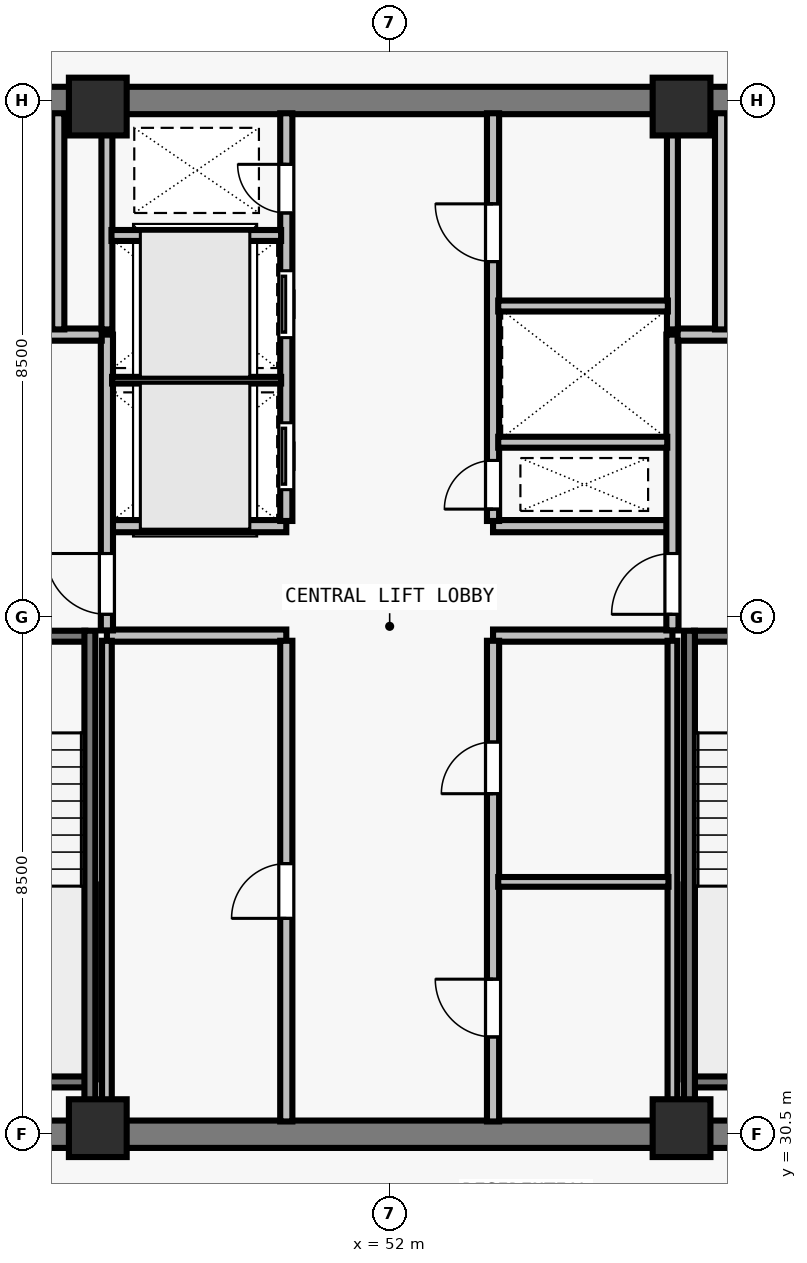
"""IFC4 building model, lengths in metres.
Left out: names, types, materials, properties, quantities, classifications, styles, units other than length and angle.
Written with IfcOpenShell. Run it as: python <this file> out.ifc"""

import sys

from ifc_helpers import new_model, si_unit, direction, frame, frame_2d, origin, origin_2d, place, context, subcontext, project, spatial, rectangle, extrude, element, fill, save


model = new_model("IFC4")
c1 = context("Model", 3, precision=1e-05, world=origin(), true_north=direction((0.0, 1.0)))
c2 = subcontext(c1, "Body", "Model", "MODEL_VIEW")
j1 = project(units=[si_unit("LENGTHUNIT", "METRE"), si_unit("PLANEANGLEUNIT", "RADIAN")], contexts=[c1])
p1 = place(None, origin())
s1 = spatial("IfcSite", under=j1, at=p1, CompositionType="ELEMENT")
p2 = place(p1, origin())
s2 = spatial("IfcBuilding", under=s1, at=p2, CompositionType="ELEMENT")
p3 = place(p2, frame((0.0, 0.0, 262.0)))
s3 = spatial("IfcBuildingStorey", under=s2, at=p3, CompositionType="ELEMENT", Elevation=262.0)
for number, where, z_axis, x_axis in (
    (1, (47.2, 30.6, 0.0), (0.0, 0.0, 1.0), (1.0, 0.0, 0.0)),
    (2, (56.8, 30.6, 0.0), (0.0, 0.0, 1.0), (1.0, 0.0, 0.0)),
    (3, (47.2, 47.4, 0.0), (0.0, 0.0, 1.0), (1.0, 0.0, 0.0)),
    (4, (56.8, 47.4, 0.0), (0.0, 0.0, 1.0), (1.0, 0.0, 0.0)),
):
    element("IfcColumn", number, at=place(p3, frame(where, z_axis=z_axis, x_axis=x_axis)), inside=s3, PredefinedType="COLUMN", context=c2, shape_type="SweptSolid", body=[
        extrude(rectangle(XDim=0.95, YDim=0.95, at=origin_2d()), origin(), (0.0, 0.0, 1.0), 3.5),
    ])
for number, where, z_axis, x_axis in (
    (5, (43.275, 30.5, 0.0), (0.0, 0.0, 1.0), (1.0, 0.0, 0.0)),
    (6, (43.275, 47.5, 0.0), (0.0, 0.0, 1.0), (1.0, 0.0, 0.0)),
):
    element("IfcWall", number, at=place(p3, frame(where, z_axis=z_axis, x_axis=x_axis)), inside=s3, PredefinedType="SHEAR", context=c2, shape_type="SweptSolid", body=[
        extrude(rectangle(XDim=17.45, YDim=0.45, at=frame_2d((8.725, 0.0))), origin(), (0.0, 0.0, 1.0), 3.29),
    ])
for number, where, z_axis, x_axis in (
    (7, (47.35, 38.7, 0.0), (0.0, 0.0, 1.0), (1.0, 0.0, 0.0)),
    (8, (47.35, 40.5, 0.0), (0.0, 0.0, 1.0), (1.0, 0.0, 0.0)),
    (9, (53.7, 38.7, 0.0), (0.0, 0.0, 1.0), (1.0, 0.0, 0.0)),
    (10, (53.7, 40.5, 0.0), (0.0, 0.0, 1.0), (1.0, 0.0, 0.0)),
):
    element("IfcWall", number, at=place(p3, frame(where, z_axis=z_axis, x_axis=x_axis)), inside=s3, PredefinedType="SOLIDWALL", context=c2, shape_type="SweptSolid", body=[
        extrude(rectangle(XDim=2.95, YDim=0.2, at=frame_2d((1.475, 0.0))), origin(), (0.0, 0.0, 1.0), 3.29),
    ])
p4 = place(p3, frame((50.3, 30.71, 0.0), z_axis=(0.0, 0.0, 1.0), x_axis=(0.0, 1.0, 0.0)))
e11 = element("IfcWall", 11, at=p4, inside=s3, PredefinedType="SOLIDWALL", context=c2, shape_type="SweptSolid", body=[
    extrude(rectangle(XDim=7.905, YDim=0.2, at=frame_2d((3.953, 0.0))), origin(), (0.0, 0.0, 1.0), 3.29),
])
p5 = place(p4, frame((3.34, 0.0, 0.0)))
e12 = element("IfcOpeningElement", 12, at=p5, cuts=e11, PredefinedType="OPENING", context=c2, shape_type="SweptSolid", body=[
    extrude(rectangle(XDim=0.9, YDim=2.12, at=frame_2d((0.45, 1.06))), frame((0.0, 0.11, 0.0), z_axis=(0.0, -1.0, 0.0), x_axis=(1.0, 0.0, 0.0)), (0.0, 0.0, 1.0), 0.22),
])
p6 = place(p3, frame((53.7, 30.71, 0.0), z_axis=(0.0, 0.0, 1.0), x_axis=(0.0, 1.0, 0.0)))
e13 = element("IfcWall", 13, at=p6, inside=s3, PredefinedType="SOLIDWALL", context=c2, shape_type="SweptSolid", body=[
    extrude(rectangle(XDim=7.905, YDim=0.2, at=frame_2d((3.953, 0.0))), origin(), (0.0, 0.0, 1.0), 3.29),
])
p7 = place(p6, frame((1.39, 0.0, 0.0)))
e14 = element("IfcOpeningElement", 14, at=p7, cuts=e13, PredefinedType="OPENING", context=c2, shape_type="SweptSolid", body=[
    extrude(rectangle(XDim=0.95, YDim=2.12, at=frame_2d((0.475, 1.06))), frame((0.0, 0.11, 0.0), z_axis=(0.0, -1.0, 0.0), x_axis=(1.0, 0.0, 0.0)), (0.0, 0.0, 1.0), 0.22),
])
p8 = place(p6, frame((5.39, 0.0, 0.0)))
e15 = element("IfcOpeningElement", 15, at=p8, cuts=e13, PredefinedType="OPENING", context=c2, shape_type="SweptSolid", body=[
    extrude(rectangle(XDim=0.85, YDim=2.12, at=frame_2d((0.425, 1.06))), frame((0.0, 0.11, 0.0), z_axis=(0.0, -1.0, 0.0), x_axis=(1.0, 0.0, 0.0)), (0.0, 0.0, 1.0), 0.22),
])
p9 = place(p3, frame((50.3, 40.585, 0.0), z_axis=(0.0, 0.0, 1.0), x_axis=(0.0, 1.0, 0.0)))
e16 = element("IfcWall", 16, at=p9, inside=s3, PredefinedType="SOLIDWALL", context=c2, shape_type="SweptSolid", body=[
    extrude(rectangle(XDim=6.705, YDim=0.2, at=frame_2d((3.353, 0.0))), origin(), (0.0, 0.0, 1.0), 3.29),
])
p10 = place(p9, frame((0.515, 0.0, 0.0)))
e17 = element("IfcOpeningElement", 17, at=p10, cuts=e16, PredefinedType="OPENING", context=c2, shape_type="SweptSolid", body=[
    extrude(rectangle(XDim=1.1, YDim=2.2, at=frame_2d((0.55, 1.1))), frame((0.0, 0.11, 0.0), z_axis=(0.0, -1.0, 0.0), x_axis=(1.0, 0.0, 0.0)), (0.0, 0.0, 1.0), 0.22),
])
p11 = place(p9, frame((3.015, 0.0, 0.0)))
e18 = element("IfcOpeningElement", 18, at=p11, cuts=e16, PredefinedType="OPENING", context=c2, shape_type="SweptSolid", body=[
    extrude(rectangle(XDim=1.1, YDim=2.2, at=frame_2d((0.55, 1.1))), frame((0.0, 0.11, 0.0), z_axis=(0.0, -1.0, 0.0), x_axis=(1.0, 0.0, 0.0)), (0.0, 0.0, 1.0), 0.22),
])
p12 = place(p9, frame((5.065, 0.0, 0.0)))
e19 = element("IfcOpeningElement", 19, at=p12, cuts=e16, PredefinedType="OPENING", context=c2, shape_type="SweptSolid", body=[
    extrude(rectangle(XDim=0.8, YDim=2.08, at=frame_2d((0.4, 1.04))), frame((0.0, 0.11, 0.0), z_axis=(0.0, -1.0, 0.0), x_axis=(1.0, 0.0, 0.0)), (0.0, 0.0, 1.0), 0.22),
])
p13 = place(p3, frame((53.7, 40.585, 0.0), z_axis=(0.0, 0.0, 1.0), x_axis=(0.0, 1.0, 0.0)))
e20 = element("IfcWall", 20, at=p13, inside=s3, PredefinedType="SOLIDWALL", context=c2, shape_type="SweptSolid", body=[
    extrude(rectangle(XDim=6.705, YDim=0.2, at=frame_2d((3.353, 0.0))), origin(), (0.0, 0.0, 1.0), 3.29),
])
p14 = place(p13, frame((0.195, 0.0, 0.0)))
e21 = element("IfcOpeningElement", 21, at=p14, cuts=e20, PredefinedType="OPENING", context=c2, shape_type="SweptSolid", body=[
    extrude(rectangle(XDim=0.8, YDim=2.08, at=frame_2d((0.4, 1.04))), frame((0.0, 0.11, 0.0), z_axis=(0.0, -1.0, 0.0), x_axis=(1.0, 0.0, 0.0)), (0.0, 0.0, 1.0), 0.22),
])
p15 = place(p13, frame((4.265, 0.0, 0.0)))
e22 = element("IfcOpeningElement", 22, at=p15, cuts=e20, PredefinedType="OPENING", context=c2, shape_type="SweptSolid", body=[
    extrude(rectangle(XDim=0.95, YDim=2.12, at=frame_2d((0.475, 1.06))), frame((0.0, 0.11, 0.0), z_axis=(0.0, -1.0, 0.0), x_axis=(1.0, 0.0, 0.0)), (0.0, 0.0, 1.0), 0.22),
])
p16 = place(p3, frame((47.35, 38.785, 0.0), z_axis=(0.0, 0.0, 1.0), x_axis=(0.0, 1.0, 0.0)))
e23 = element("IfcWall", 23, at=p16, inside=s3, PredefinedType="SOLIDWALL", context=c2, shape_type="SweptSolid", body=[
    extrude(rectangle(XDim=4.865, YDim=0.2, at=frame_2d((2.433, 0.0))), origin(), (0.0, 0.0, 1.0), 3.29),
])
p17 = place(p16, frame((0.265, 0.0, 0.0)))
e24 = element("IfcOpeningElement", 24, at=p17, cuts=e23, PredefinedType="OPENING", context=c2, shape_type="SweptSolid", body=[
    extrude(rectangle(XDim=1.0, YDim=2.15, at=frame_2d((0.5, 1.075))), frame((0.0, 0.11, 0.0), z_axis=(0.0, -1.0, 0.0), x_axis=(1.0, 0.0, 0.0)), (0.0, 0.0, 1.0), 0.22),
])
p18 = place(p3, frame((43.71, 43.65, 0.0), z_axis=(0.0, 0.0, 1.0), x_axis=(1.0, 0.0, 0.0)))
e25 = element("IfcWall", 25, at=p18, inside=s3, PredefinedType="SOLIDWALL", context=c2, shape_type="SweptSolid", body=[
    extrude(rectangle(XDim=3.555, YDim=0.2, at=frame_2d((1.777, 0.0))), origin(), (0.0, 0.0, 1.0), 3.29),
])
p19 = place(p18, frame((1.16, 0.0, 0.0)))
e26 = element("IfcOpeningElement", 26, at=p19, cuts=e25, PredefinedType="OPENING", context=c2, shape_type="SweptSolid", body=[
    extrude(rectangle(XDim=1.1, YDim=2.2, at=frame_2d((0.55, 1.1))), frame((0.0, 0.11, 0.0), z_axis=(0.0, -1.0, 0.0), x_axis=(1.0, 0.0, 0.0)), (0.0, 0.0, 1.0), 0.22),
])
p20 = place(p3, frame((46.55, 43.735, 0.0), z_axis=(0.0, 0.0, 1.0), x_axis=(0.0, 1.0, 0.0)))
e27 = element("IfcWall", 27, at=p20, inside=s3, PredefinedType="SOLIDWALL", context=c2, shape_type="SweptSolid", body=[
    extrude(rectangle(XDim=3.555, YDim=0.2, at=frame_2d((1.777, 0.0))), origin(), (0.0, 0.0, 1.0), 3.29),
])
p21 = place(p3, frame((56.65, 38.785, 0.0), z_axis=(0.0, 0.0, 1.0), x_axis=(0.0, 1.0, 0.0)))
e28 = element("IfcWall", 28, at=p21, inside=s3, PredefinedType="SOLIDWALL", context=c2, shape_type="SweptSolid", body=[
    extrude(rectangle(XDim=4.865, YDim=0.2, at=frame_2d((2.433, 0.0))), origin(), (0.0, 0.0, 1.0), 3.29),
])
p22 = place(p21, frame((0.265, 0.0, 0.0)))
e29 = element("IfcOpeningElement", 29, at=p22, cuts=e28, PredefinedType="OPENING", context=c2, shape_type="SweptSolid", body=[
    extrude(rectangle(XDim=1.0, YDim=2.15, at=frame_2d((0.5, 1.075))), frame((0.0, 0.11, 0.0), z_axis=(0.0, -1.0, 0.0), x_axis=(1.0, 0.0, 0.0)), (0.0, 0.0, 1.0), 0.22),
])
p23 = place(p3, frame((56.735, 43.65, 0.0), z_axis=(0.0, 0.0, 1.0), x_axis=(1.0, 0.0, 0.0)))
e30 = element("IfcWall", 30, at=p23, inside=s3, PredefinedType="SOLIDWALL", context=c2, shape_type="SweptSolid", body=[
    extrude(rectangle(XDim=3.555, YDim=0.2, at=frame_2d((1.777, 0.0))), origin(), (0.0, 0.0, 1.0), 3.29),
])
p24 = place(p23, frame((1.295, 0.0, 0.0)))
e31 = element("IfcOpeningElement", 31, at=p24, cuts=e30, PredefinedType="OPENING", context=c2, shape_type="SweptSolid", body=[
    extrude(rectangle(XDim=1.1, YDim=2.2, at=frame_2d((0.55, 1.1))), frame((0.0, 0.11, 0.0), z_axis=(0.0, -1.0, 0.0), x_axis=(1.0, 0.0, 0.0)), (0.0, 0.0, 1.0), 0.22),
])
p25 = place(p3, frame((57.45, 43.735, 0.0), z_axis=(0.0, 0.0, 1.0), x_axis=(0.0, 1.0, 0.0)))
e32 = element("IfcWall", 32, at=p25, inside=s3, PredefinedType="SOLIDWALL", context=c2, shape_type="SweptSolid", body=[
    extrude(rectangle(XDim=3.555, YDim=0.2, at=frame_2d((1.777, 0.0))), origin(), (0.0, 0.0, 1.0), 3.29),
])
for number, where, z_axis, x_axis in (
    (33, (47.35, 30.71, 0.0), (0.0, 0.0, 1.0), (0.0, 1.0, 0.0)),
    (34, (56.65, 30.71, 0.0), (0.0, 0.0, 1.0), (0.0, 1.0, 0.0)),
):
    element("IfcWall", number, at=place(p3, frame(where, z_axis=z_axis, x_axis=x_axis)), inside=s3, PredefinedType="PARTITIONING", context=c2, shape_type="SweptSolid", body=[
        extrude(rectangle(XDim=7.905, YDim=0.16, at=frame_2d((3.953, 0.0))), origin(), (0.0, 0.0, 1.0), 3.29),
    ])
p26 = place(p3, frame((53.785, 34.65, 0.0), z_axis=(0.0, 0.0, 1.0), x_axis=(1.0, 0.0, 0.0)))
e35 = element("IfcWall", 35, at=p26, inside=s3, PredefinedType="PARTITIONING", context=c2, shape_type="SweptSolid", body=[
    extrude(rectangle(XDim=2.8, YDim=0.16, at=frame_2d((1.4, 0.0))), origin(), (0.0, 0.0, 1.0), 3.29),
])
p27 = place(p3, frame((47.35, 43.735, 0.0), z_axis=(0.0, 0.0, 1.0), x_axis=(0.0, 1.0, 0.0)))
e36 = element("IfcWall", 36, at=p27, inside=s3, PredefinedType="SOLIDWALL", context=c2, shape_type="SweptSolid", body=[
    extrude(rectangle(XDim=3.555, YDim=0.18, at=frame_2d((1.777, 0.0))), origin(), (0.0, 0.0, 1.0), 3.29),
])
p28 = place(p3, frame((47.435, 42.9, 0.0), z_axis=(0.0, 0.0, 1.0), x_axis=(1.0, 0.0, 0.0)))
e37 = element("IfcWall", 37, at=p28, inside=s3, PredefinedType="PARTITIONING", context=c2, shape_type="SweptSolid", body=[
    extrude(rectangle(XDim=2.78, YDim=0.11, at=frame_2d((1.39, 0.0))), origin(), (0.0, 0.0, 1.0), 3.29),
])
p29 = place(p3, frame((47.425, 45.28, 0.0), z_axis=(0.0, 0.0, 1.0), x_axis=(1.0, 0.0, 0.0)))
e38 = element("IfcWall", 38, at=p29, inside=s3, PredefinedType="SOLIDWALL", context=c2, shape_type="SweptSolid", body=[
    extrude(rectangle(XDim=2.79, YDim=0.18, at=frame_2d((1.395, 0.0))), origin(), (0.0, 0.0, 1.0), 3.29),
])
p30 = place(p3, frame((56.65, 43.735, 0.0), z_axis=(0.0, 0.0, 1.0), x_axis=(0.0, 1.0, 0.0)))
e39 = element("IfcWall", 39, at=p30, inside=s3, PredefinedType="SOLIDWALL", context=c2, shape_type="SweptSolid", body=[
    extrude(rectangle(XDim=3.555, YDim=0.18, at=frame_2d((1.777, 0.0))), origin(), (0.0, 0.0, 1.0), 3.29),
])
p31 = place(p3, frame((53.785, 41.88, 0.0), z_axis=(0.0, 0.0, 1.0), x_axis=(1.0, 0.0, 0.0)))
e40 = element("IfcWall", 40, at=p31, inside=s3, PredefinedType="SOLIDWALL", context=c2, shape_type="SweptSolid", body=[
    extrude(rectangle(XDim=2.78, YDim=0.18, at=frame_2d((1.39, 0.0))), origin(), (0.0, 0.0, 1.0), 3.29),
])
p32 = place(p3, frame((53.785, 44.12, 0.0), z_axis=(0.0, 0.0, 1.0), x_axis=(1.0, 0.0, 0.0)))
e41 = element("IfcWall", 41, at=p32, inside=s3, PredefinedType="SOLIDWALL", context=c2, shape_type="SweptSolid", body=[
    extrude(rectangle(XDim=2.79, YDim=0.18, at=frame_2d((1.395, 0.0))), origin(), (0.0, 0.0, 1.0), 3.29),
])
p33 = place(p3, frame((43.715, 38.69, 0.0), z_axis=(0.0, 0.0, 1.0), x_axis=(1.0, 0.0, 0.0)))
e42 = element("IfcWall", 42, at=p33, inside=s3, PredefinedType="SOLIDWALL", context=c2, shape_type="SweptSolid", body=[
    extrude(rectangle(XDim=3.28, YDim=0.18, at=frame_2d((1.64, 0.0))), origin(), (0.0, 0.0, 1.0), 3.29),
])
p34 = place(p33, frame((1.165, 0.0, 0.0)))
e43 = element("IfcOpeningElement", 43, at=p34, cuts=e42, PredefinedType="OPENING", context=c2, shape_type="SweptSolid", body=[
    extrude(rectangle(XDim=0.95, YDim=2.15, at=frame_2d((0.475, 1.075))), frame((0.0, 0.1, 0.0), z_axis=(0.0, -1.0, 0.0), x_axis=(1.0, 0.0, 0.0)), (0.0, 0.0, 1.0), 0.2),
])
p35 = place(p3, frame((43.715, 31.36, 0.0), z_axis=(0.0, 0.0, 1.0), x_axis=(1.0, 0.0, 0.0)))
e44 = element("IfcWall", 44, at=p35, inside=s3, PredefinedType="SOLIDWALL", context=c2, shape_type="SweptSolid", body=[
    extrude(rectangle(XDim=3.28, YDim=0.18, at=frame_2d((1.64, 0.0))), origin(), (0.0, 0.0, 1.0), 3.29),
])
p36 = place(p3, frame((47.07, 38.78, 0.0), z_axis=(0.0, 0.0, 1.0), x_axis=(0.0, -1.0, 0.0)))
e45 = element("IfcWall", 45, at=p36, inside=s3, PredefinedType="SOLIDWALL", context=c2, shape_type="SweptSolid", body=[
    extrude(rectangle(XDim=8.067, YDim=0.18, at=frame_2d((4.034, 0.0))), origin(), (0.0, 0.0, 1.0), 3.29),
])
p37 = place(p3, frame((57.005, 38.69, 0.0), z_axis=(0.0, 0.0, 1.0), x_axis=(1.0, 0.0, 0.0)))
e46 = element("IfcWall", 46, at=p37, inside=s3, PredefinedType="SOLIDWALL", context=c2, shape_type="SweptSolid", body=[
    extrude(rectangle(XDim=3.28, YDim=0.18, at=frame_2d((1.64, 0.0))), origin(), (0.0, 0.0, 1.0), 3.29),
])
p38 = place(p37, frame((1.165, 0.0, 0.0)))
e47 = element("IfcOpeningElement", 47, at=p38, cuts=e46, PredefinedType="OPENING", context=c2, shape_type="SweptSolid", body=[
    extrude(rectangle(XDim=0.95, YDim=2.15, at=frame_2d((0.475, 1.075))), frame((0.0, 0.1, 0.0), z_axis=(0.0, -1.0, 0.0), x_axis=(1.0, 0.0, 0.0)), (0.0, 0.0, 1.0), 0.2),
])
p39 = place(p3, frame((57.005, 31.36, 0.0), z_axis=(0.0, 0.0, 1.0), x_axis=(1.0, 0.0, 0.0)))
e48 = element("IfcWall", 48, at=p39, inside=s3, PredefinedType="SOLIDWALL", context=c2, shape_type="SweptSolid", body=[
    extrude(rectangle(XDim=3.28, YDim=0.18, at=frame_2d((1.64, 0.0))), origin(), (0.0, 0.0, 1.0), 3.29),
])
p40 = place(p3, frame((56.93, 38.78, 0.0), z_axis=(0.0, 0.0, 1.0), x_axis=(0.0, -1.0, 0.0)))
e49 = element("IfcWall", 49, at=p40, inside=s3, PredefinedType="SOLIDWALL", context=c2, shape_type="SweptSolid", body=[
    extrude(rectangle(XDim=8.067, YDim=0.18, at=frame_2d((4.034, 0.0))), origin(), (0.0, 0.0, 1.0), 3.29),
])
p41 = place(p17, origin())
e50 = element("IfcDoor", 50, at=p41, inside=s3, OperationType="SINGLE_SWING_RIGHT", PredefinedType="DOOR", context=c2, shape_type="SweptSolid", body=[
    extrude(rectangle(XDim=1.0, YDim=2.15, at=frame_2d((0.5, 1.075))), frame((0.0, 0.025, 0.0), z_axis=(0.0, -1.0, 0.0), x_axis=(1.0, 0.0, 0.0)), (0.0, 0.0, 1.0), 0.05),
])
fill(e24, e50)
p42 = place(p22, origin())
e51 = element("IfcDoor", 51, at=p42, inside=s3, OperationType="SINGLE_SWING_LEFT", PredefinedType="DOOR", context=c2, shape_type="SweptSolid", body=[
    extrude(rectangle(XDim=1.0, YDim=2.15, at=frame_2d((0.5, 1.075))), frame((0.0, 0.025, 0.0), z_axis=(0.0, -1.0, 0.0), x_axis=(1.0, 0.0, 0.0)), (0.0, 0.0, 1.0), 0.05),
])
fill(e29, e51)
p43 = place(p5, origin())
e52 = element("IfcDoor", 52, at=p43, inside=s3, OperationType="SINGLE_SWING_LEFT", PredefinedType="DOOR", context=c2, shape_type="SweptSolid", body=[
    extrude(rectangle(XDim=0.9, YDim=2.12, at=frame_2d((0.45, 1.06))), frame((0.0, 0.025, 0.0), z_axis=(0.0, -1.0, 0.0), x_axis=(1.0, 0.0, 0.0)), (0.0, 0.0, 1.0), 0.05),
])
fill(e12, e52)
p44 = place(p7, origin())
e53 = element("IfcDoor", 53, at=p44, inside=s3, OperationType="SINGLE_SWING_RIGHT", PredefinedType="DOOR", context=c2, shape_type="SweptSolid", body=[
    extrude(rectangle(XDim=0.95, YDim=2.12, at=frame_2d((0.475, 1.06))), frame((0.0, 0.025, 0.0), z_axis=(0.0, -1.0, 0.0), x_axis=(1.0, 0.0, 0.0)), (0.0, 0.0, 1.0), 0.05),
])
fill(e14, e53)
p45 = place(p8, origin())
e54 = element("IfcDoor", 54, at=p45, inside=s3, OperationType="SINGLE_SWING_LEFT", PredefinedType="DOOR", context=c2, shape_type="SweptSolid", body=[
    extrude(rectangle(XDim=0.85, YDim=2.12, at=frame_2d((0.425, 1.06))), frame((0.0, 0.025, 0.0), z_axis=(0.0, -1.0, 0.0), x_axis=(1.0, 0.0, 0.0)), (0.0, 0.0, 1.0), 0.05),
])
fill(e15, e54)
p46 = place(p10, origin())
e55 = element("IfcDoor", 55, at=p46, inside=s3, OperationType="SLIDING_TO_LEFT", PredefinedType="DOOR", context=c2, shape_type="SweptSolid", body=[
    extrude(rectangle(XDim=1.1, YDim=2.2, at=frame_2d((0.55, 1.1))), frame((0.0, 0.025, 0.0), z_axis=(0.0, -1.0, 0.0), x_axis=(1.0, 0.0, 0.0)), (0.0, 0.0, 1.0), 0.05),
])
fill(e17, e55)
p47 = place(p11, origin())
e56 = element("IfcDoor", 56, at=p47, inside=s3, OperationType="SLIDING_TO_LEFT", PredefinedType="DOOR", context=c2, shape_type="SweptSolid", body=[
    extrude(rectangle(XDim=1.1, YDim=2.2, at=frame_2d((0.55, 1.1))), frame((0.0, 0.025, 0.0), z_axis=(0.0, -1.0, 0.0), x_axis=(1.0, 0.0, 0.0)), (0.0, 0.0, 1.0), 0.05),
])
fill(e18, e56)
p48 = place(p12, origin())
e57 = element("IfcDoor", 57, at=p48, inside=s3, OperationType="SINGLE_SWING_RIGHT", PredefinedType="DOOR", context=c2, shape_type="SweptSolid", body=[
    extrude(rectangle(XDim=0.8, YDim=2.08, at=frame_2d((0.4, 1.04))), frame((0.0, 0.025, 0.0), z_axis=(0.0, -1.0, 0.0), x_axis=(1.0, 0.0, 0.0)), (0.0, 0.0, 1.0), 0.05),
])
fill(e19, e57)
p49 = place(p14, origin())
e58 = element("IfcDoor", 58, at=p49, inside=s3, OperationType="SINGLE_SWING_LEFT", PredefinedType="DOOR", context=c2, shape_type="SweptSolid", body=[
    extrude(rectangle(XDim=0.8, YDim=2.08, at=frame_2d((0.4, 1.04))), frame((0.0, 0.025, 0.0), z_axis=(0.0, -1.0, 0.0), x_axis=(1.0, 0.0, 0.0)), (0.0, 0.0, 1.0), 0.05),
])
fill(e21, e58)
p50 = place(p15, origin())
e59 = element("IfcDoor", 59, at=p50, inside=s3, OperationType="SINGLE_SWING_RIGHT", PredefinedType="DOOR", context=c2, shape_type="SweptSolid", body=[
    extrude(rectangle(XDim=0.95, YDim=2.12, at=frame_2d((0.475, 1.06))), frame((0.0, 0.025, 0.0), z_axis=(0.0, -1.0, 0.0), x_axis=(1.0, 0.0, 0.0)), (0.0, 0.0, 1.0), 0.05),
])
fill(e22, e59)
save(model, sys.argv[1])
